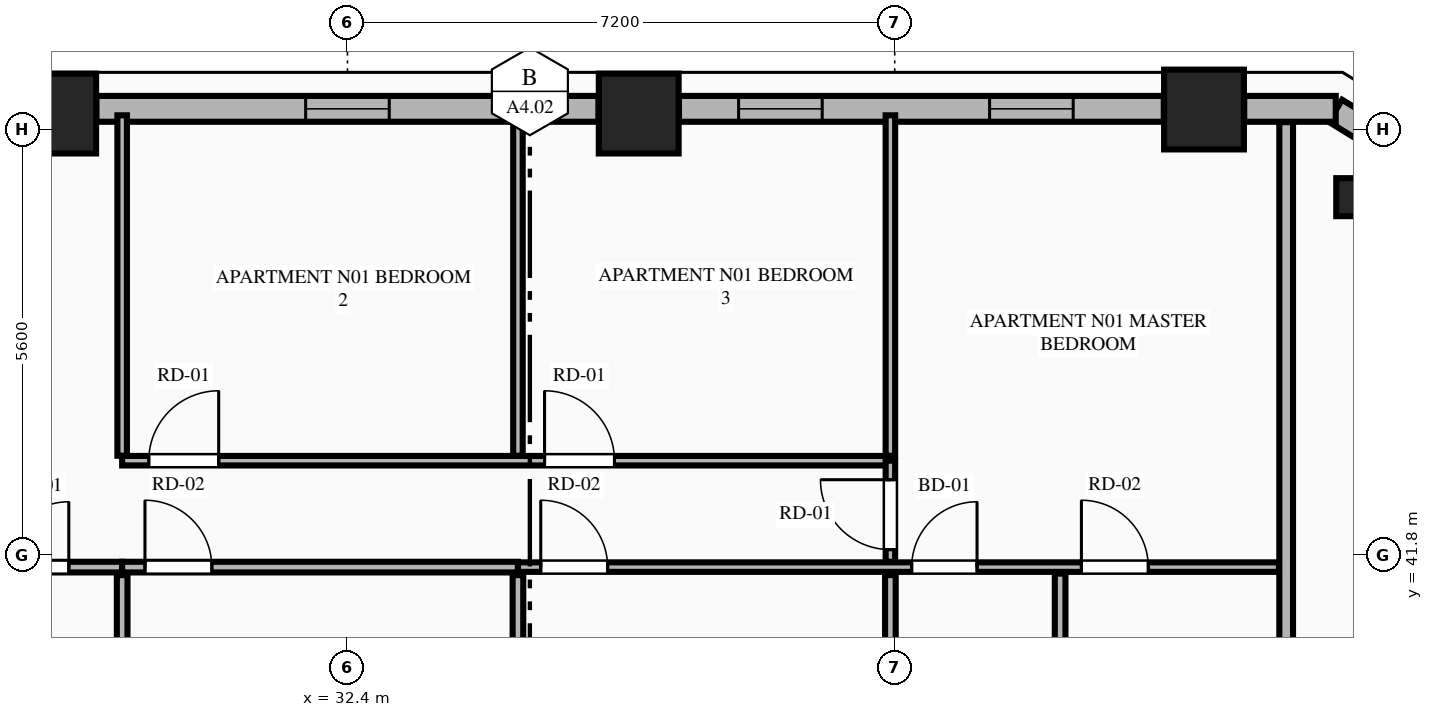
"""IFC4 building model, lengths in metres.
Left out: names, types, materials, properties, quantities, classifications, styles, units other than length and angle.
Written with IfcOpenShell. Run it as: python <this file> out.ifc"""

import sys

from ifc_helpers import new_model, si_unit, direction, frame, frame_2d, origin, origin_2d, place, context, subcontext, project, spatial, rectangle, extrude, element, fill, save


model = new_model("IFC4")
c1 = context("Model", 3, precision=1e-05, world=origin(), true_north=direction((0.0, 1.0)))
c2 = subcontext(c1, "Body", "Model", "MODEL_VIEW")
j1 = project(units=[si_unit("LENGTHUNIT", "METRE"), si_unit("PLANEANGLEUNIT", "RADIAN")], contexts=[c1])
p1 = place(None, origin())
s1 = spatial("IfcSite", under=j1, at=p1, CompositionType="ELEMENT")
p2 = place(p1, origin())
s2 = spatial("IfcBuilding", under=s1, at=p2, CompositionType="ELEMENT")
p3 = place(p2, frame((0.0, 0.0, 144.55)))
s3 = spatial("IfcBuildingStorey", under=s2, at=p3, CompositionType="ELEMENT", Elevation=144.55)
for number, where, z_axis, x_axis in (
    (1, (43.669, 47.661, 0.0), (0.0, 0.0, 1.0), (1.0, 0.0, 0.0)),
    (2, (36.232, 47.608, 0.0), (0.0, 0.0, 1.0), (1.0, 0.0, 0.0)),
    (3, (28.568, 47.608, 0.0), (0.0, 0.0, 1.0), (1.0, 0.0, 0.0)),
):
    element("IfcColumn", number, at=place(p3, frame(where, z_axis=z_axis, x_axis=x_axis)), inside=s3, PredefinedType="COLUMN", context=c2, shape_type="SweptSolid", body=[
        extrude(rectangle(XDim=1.05, YDim=1.05, at=origin_2d()), origin(), (0.0, 0.0, 1.0), 3.55),
    ])
p4 = place(p3, frame((45.659, 46.508, 0.0), z_axis=(0.0, 0.0, 1.0), x_axis=(-0.865160173452, 0.501495637342, 0.0)))
e4 = element("IfcColumn", 4, at=p4, inside=s3, PredefinedType="PILASTER", context=c2, shape_type="SweptSolid", body=[
    extrude(rectangle(XDim=0.5, YDim=0.35, at=origin_2d()), origin(), (0.0, 0.0, 1.0), 3.55),
])
p5 = place(p3, frame((46.971, 46.677, 0.0), z_axis=(0.0, 0.0, 1.0), x_axis=(-0.851798915137, 0.523868884523, 0.0)))
e5 = element("IfcWall", 5, at=p5, inside=s3, PredefinedType="STANDARD", context=c2, shape_type="SweptSolid", body=[
    extrude(rectangle(XDim=1.848, YDim=0.34, at=frame_2d((0.924, 0.0))), origin(), (0.0, 0.0, 1.0), 3.27),
])
p6 = place(p3, frame((45.402, 47.67, 0.0), z_axis=(0.0, 0.0, 1.0), x_axis=(-1.0, 0.0, 0.0)))
e6 = element("IfcWall", 6, at=p6, inside=s3, PredefinedType="STANDARD", context=c2, shape_type="SweptSolid", body=[
    extrude(rectangle(XDim=1.204, YDim=0.34, at=frame_2d((0.602, 0.0))), origin(), (0.0, 0.0, 1.0), 3.27),
])
p7 = place(p3, frame((43.14, 47.67, 0.0), z_axis=(0.0, 0.0, 1.0), x_axis=(-1.0, 0.0, 0.0)))
e7 = element("IfcWall", 7, at=p7, inside=s3, PredefinedType="STANDARD", context=c2, shape_type="SweptSolid", body=[
    extrude(rectangle(XDim=6.379, YDim=0.34, at=frame_2d((3.189, 0.0))), origin(), (0.0, 0.0, 1.0), 2.727),
])
p8 = place(p7, frame((1.192, 0.0, 0.75)))
e8 = element("IfcOpeningElement", 8, at=p8, cuts=e7, PredefinedType="OPENING", context=c2, shape_type="SweptSolid", body=[
    extrude(rectangle(XDim=1.1, YDim=1.827, at=frame_2d((0.55, 0.914))), frame((0.0, 0.18, 0.0), z_axis=(0.0, -1.0, 0.0), x_axis=(1.0, 0.0, 0.0)), (0.0, 0.0, 1.0), 0.36),
])
p9 = place(p7, frame((4.494, 0.0, 0.75)))
e9 = element("IfcOpeningElement", 9, at=p9, cuts=e7, PredefinedType="OPENING", context=c2, shape_type="SweptSolid", body=[
    extrude(rectangle(XDim=1.1, YDim=1.827, at=frame_2d((0.55, 0.914))), frame((0.0, 0.18, 0.0), z_axis=(0.0, -1.0, 0.0), x_axis=(1.0, 0.0, 0.0)), (0.0, 0.0, 1.0), 0.36),
])
p10 = place(p3, frame((35.703, 47.67, 0.0), z_axis=(0.0, 0.0, 1.0), x_axis=(-1.0, 0.0, 0.0)))
e10 = element("IfcWall", 10, at=p10, inside=s3, PredefinedType="STANDARD", context=c2, shape_type="SweptSolid", body=[
    extrude(rectangle(XDim=6.606, YDim=0.34, at=frame_2d((3.303, 0.0))), origin(), (0.0, 0.0, 1.0), 2.727),
])
p11 = place(p10, frame((2.753, 0.0, 0.75)))
e11 = element("IfcOpeningElement", 11, at=p11, cuts=e10, PredefinedType="OPENING", context=c2, shape_type="SweptSolid", body=[
    extrude(rectangle(XDim=1.1, YDim=1.827, at=frame_2d((0.55, 0.914))), frame((0.0, 0.18, 0.0), z_axis=(0.0, -1.0, 0.0), x_axis=(1.0, 0.0, 0.0)), (0.0, 0.0, 1.0), 0.36),
])
p12 = place(p3, frame((44.75, 35.3, 0.0), z_axis=(0.0, 0.0, 1.0), x_axis=(0.0, 1.0, 0.0)))
e12 = element("IfcWall", 12, at=p12, inside=s3, PredefinedType="PARTITIONING", context=c2, shape_type="SweptSolid", body=[
    extrude(rectangle(XDim=12.195, YDim=0.18, at=frame_2d((6.098, 0.0))), origin(), (0.0, 0.0, 1.0), 3.27),
])
p13 = place(p3, frame((22.1, 41.641, 0.0), z_axis=(0.0, 0.0, 1.0), x_axis=(1.0, 0.0, 0.0)))
e13 = element("IfcWall", 13, at=p13, inside=s3, PredefinedType="PLUMBINGWALL", context=c2, shape_type="SweptSolid", body=[
    extrude(rectangle(XDim=7.336, YDim=0.14, at=frame_2d((3.668, 0.0))), origin(), (0.0, 0.0, 1.0), 3.27),
])
p14 = place(p13, frame((5.774, 0.0, 0.0)))
e14 = element("IfcOpeningElement", 14, at=p14, cuts=e13, PredefinedType="OPENING", context=c2, shape_type="SweptSolid", body=[
    extrude(rectangle(XDim=0.86, YDim=2.1, at=frame_2d((0.43, 1.05))), frame((0.0, 0.08, 0.0), z_axis=(0.0, -1.0, 0.0), x_axis=(1.0, 0.0, 0.0)), (0.0, 0.0, 1.0), 0.16),
])
p15 = place(p13, frame((0.26, 0.0, 0.0)))
e15 = element("IfcOpeningElement", 15, at=p15, cuts=e13, PredefinedType="OPENING", context=c2, shape_type="SweptSolid", body=[
    extrude(rectangle(XDim=0.88, YDim=2.15, at=frame_2d((0.44, 1.075))), frame((0.0, 0.08, 0.0), z_axis=(0.0, -1.0, 0.0), x_axis=(1.0, 0.0, 0.0)), (0.0, 0.0, 1.0), 0.16),
])
p16 = place(p13, frame((3.485, 0.0, 0.0)))
e16 = element("IfcOpeningElement", 16, at=p16, cuts=e13, PredefinedType="OPENING", context=c2, shape_type="SweptSolid", body=[
    extrude(rectangle(XDim=0.88, YDim=2.15, at=frame_2d((0.44, 1.075))), frame((0.0, 0.08, 0.0), z_axis=(0.0, -1.0, 0.0), x_axis=(1.0, 0.0, 0.0)), (0.0, 0.0, 1.0), 0.16),
])
p17 = place(p3, frame((29.436, 41.641, 0.0), z_axis=(0.0, 0.0, 1.0), x_axis=(1.0, 0.0, 0.0)))
e17 = element("IfcWall", 17, at=p17, inside=s3, PredefinedType="PLUMBINGWALL", context=c2, shape_type="SweptSolid", body=[
    extrude(rectangle(XDim=5.207, YDim=0.14, at=frame_2d((2.604, 0.0))), origin(), (0.0, 0.0, 1.0), 3.27),
])
p18 = place(p17, frame((0.3, 0.0, 0.0)))
e18 = element("IfcOpeningElement", 18, at=p18, cuts=e17, PredefinedType="OPENING", context=c2, shape_type="SweptSolid", body=[
    extrude(rectangle(XDim=0.88, YDim=2.15, at=frame_2d((0.44, 1.075))), frame((0.0, 0.08, 0.0), z_axis=(0.0, -1.0, 0.0), x_axis=(1.0, 0.0, 0.0)), (0.0, 0.0, 1.0), 0.16),
])
p19 = place(p3, frame((34.643, 41.641, 0.0), z_axis=(0.0, 0.0, 1.0), x_axis=(1.0, 0.0, 0.0)))
e19 = element("IfcWall", 19, at=p19, inside=s3, PredefinedType="PARTITIONING", context=c2, shape_type="SweptSolid", body=[
    extrude(rectangle(XDim=10.012, YDim=0.125, at=frame_2d((5.006, 0.0))), origin(), (0.0, 0.0, 1.0), 3.27),
])
p20 = place(p19, frame((5.18, 0.0, 0.0)))
e20 = element("IfcOpeningElement", 20, at=p20, cuts=e19, PredefinedType="OPENING", context=c2, shape_type="SweptSolid", body=[
    extrude(rectangle(XDim=0.86, YDim=2.1, at=frame_2d((0.43, 1.05))), frame((0.0, 0.073, 0.0), z_axis=(0.0, -1.0, 0.0), x_axis=(1.0, 0.0, 0.0)), (0.0, 0.0, 1.0), 0.145),
])
p21 = place(p19, frame((7.413, 0.0, 0.0)))
e21 = element("IfcOpeningElement", 21, at=p21, cuts=e19, PredefinedType="OPENING", context=c2, shape_type="SweptSolid", body=[
    extrude(rectangle(XDim=0.88, YDim=2.15, at=frame_2d((0.44, 1.075))), frame((0.0, 0.073, 0.0), z_axis=(0.0, -1.0, 0.0), x_axis=(1.0, 0.0, 0.0)), (0.0, 0.0, 1.0), 0.145),
])
p22 = place(p19, frame((0.3, 0.0, 0.0)))
e22 = element("IfcOpeningElement", 22, at=p22, cuts=e19, PredefinedType="OPENING", context=c2, shape_type="SweptSolid", body=[
    extrude(rectangle(XDim=0.88, YDim=2.15, at=frame_2d((0.44, 1.075))), frame((0.0, 0.073, 0.0), z_axis=(0.0, -1.0, 0.0), x_axis=(1.0, 0.0, 0.0)), (0.0, 0.0, 1.0), 0.145),
])
p23 = place(p3, frame((29.436, 43.106, 0.0), z_axis=(0.0, 0.0, 1.0), x_axis=(0.0, 1.0, 0.0)))
e23 = element("IfcWall", 23, at=p23, inside=s3, PredefinedType="PARTITIONING", context=c2, shape_type="SweptSolid", body=[
    extrude(rectangle(XDim=4.479, YDim=0.125, at=frame_2d((2.24, 0.0))), origin(), (0.0, 0.0, 1.0), 3.27),
])
p24 = place(p3, frame((29.436, 43.041, 0.0), z_axis=(0.0, 0.0, 1.0), x_axis=(1.0, 0.0, 0.0)))
e24 = element("IfcWall", 24, at=p24, inside=s3, PredefinedType="PARTITIONING", context=c2, shape_type="SweptSolid", body=[
    extrude(rectangle(XDim=10.107, YDim=0.125, at=frame_2d((5.053, 0.0))), origin(), (0.0, 0.0, 1.0), 3.27),
])
p25 = place(p24, frame((0.35, 0.0, 0.0)))
e25 = element("IfcOpeningElement", 25, at=p25, cuts=e24, PredefinedType="OPENING", context=c2, shape_type="SweptSolid", body=[
    extrude(rectangle(XDim=0.92, YDim=2.15, at=frame_2d((0.46, 1.075))), frame((0.0, 0.073, 0.0), z_axis=(0.0, -1.0, 0.0), x_axis=(1.0, 0.0, 0.0)), (0.0, 0.0, 1.0), 0.145),
])
p26 = place(p24, frame((5.557, 0.0, 0.0)))
e26 = element("IfcOpeningElement", 26, at=p26, cuts=e24, PredefinedType="OPENING", context=c2, shape_type="SweptSolid", body=[
    extrude(rectangle(XDim=0.92, YDim=2.15, at=frame_2d((0.46, 1.075))), frame((0.0, 0.073, 0.0), z_axis=(0.0, -1.0, 0.0), x_axis=(1.0, 0.0, 0.0)), (0.0, 0.0, 1.0), 0.145),
])
p27 = place(p3, frame((39.543, 41.711, 0.0), z_axis=(0.0, 0.0, 1.0), x_axis=(0.0, 1.0, 0.0)))
e27 = element("IfcWall", 27, at=p27, inside=s3, PredefinedType="PARTITIONING", context=c2, shape_type="SweptSolid", body=[
    extrude(rectangle(XDim=1.33, YDim=0.125, at=frame_2d((0.665, 0.0))), origin(), (0.0, 0.0, 1.0), 3.27),
])
p28 = place(p27, frame((0.16, 0.0, 0.0)))
e28 = element("IfcOpeningElement", 28, at=p28, cuts=e27, PredefinedType="OPENING", context=c2, shape_type="SweptSolid", body=[
    extrude(rectangle(XDim=0.92, YDim=2.15, at=frame_2d((0.46, 1.075))), frame((0.0, 0.073, 0.0), z_axis=(0.0, -1.0, 0.0), x_axis=(1.0, 0.0, 0.0)), (0.0, 0.0, 1.0), 0.145),
])
for number, where, z_axis, x_axis in (
    (29, (29.436, 35.385, 0.0), (0.0, 0.0, 1.0), (0.0, 1.0, 0.0)),
    (30, (34.643, 35.385, 0.0), (0.0, 0.0, 1.0), (0.0, 1.0, 0.0)),
):
    element("IfcWall", number, at=place(p3, frame(where, z_axis=z_axis, x_axis=x_axis)), inside=s3, PredefinedType="PLUMBINGWALL", context=c2, shape_type="SweptSolid", body=[
        extrude(rectangle(XDim=6.151, YDim=0.14, at=frame_2d((3.075, 0.0))), origin(), (0.0, 0.0, 1.0), 3.27),
    ])
for number, where, z_axis, x_axis in (
    (31, (34.643, 43.106, 0.0), (0.0, 0.0, 1.0), (0.0, 1.0, 0.0)),
    (32, (39.543, 43.106, 0.0), (0.0, 0.0, 1.0), (0.0, 1.0, 0.0)),
):
    element("IfcWall", number, at=place(p3, frame(where, z_axis=z_axis, x_axis=x_axis)), inside=s3, PredefinedType="PARTITIONING", context=c2, shape_type="SweptSolid", body=[
        extrude(rectangle(XDim=4.479, YDim=0.125, at=frame_2d((2.24, 0.0))), origin(), (0.0, 0.0, 1.0), 3.27),
    ])
p29 = place(p3, frame((39.543, 35.385, 0.0), z_axis=(0.0, 0.0, 1.0), x_axis=(0.0, 1.0, 0.0)))
e33 = element("IfcWall", 33, at=p29, inside=s3, PredefinedType="PLUMBINGWALL", context=c2, shape_type="SweptSolid", body=[
    extrude(rectangle(XDim=6.151, YDim=0.14, at=frame_2d((3.075, 0.0))), origin(), (0.0, 0.0, 1.0), 3.27),
])
p30 = place(p3, frame((41.776, 35.385, 0.0), z_axis=(0.0, 0.0, 1.0), x_axis=(0.0, 1.0, 0.0)))
e34 = element("IfcWall", 34, at=p30, inside=s3, PredefinedType="PLUMBINGWALL", context=c2, shape_type="SweptSolid", body=[
    extrude(rectangle(XDim=6.171, YDim=0.14, at=frame_2d((3.085, 0.0))), origin(), (0.0, 0.0, 1.0), 2.652),
])
p31 = place(p8, origin())
e35 = element("IfcWindow", 35, at=p31, inside=s3, PartitioningType="SINGLE_PANEL", PredefinedType="WINDOW", context=c2, shape_type="SweptSolid", body=[
    extrude(rectangle(XDim=1.1, YDim=1.827, at=frame_2d((0.55, 0.914))), frame((0.0, 0.03, 0.0), z_axis=(0.0, -1.0, 0.0), x_axis=(1.0, 0.0, 0.0)), (0.0, 0.0, 1.0), 0.06),
])
fill(e8, e35)
p32 = place(p11, origin())
e36 = element("IfcWindow", 36, at=p32, inside=s3, PartitioningType="SINGLE_PANEL", PredefinedType="WINDOW", context=c2, shape_type="SweptSolid", body=[
    extrude(rectangle(XDim=1.1, YDim=1.827, at=frame_2d((0.55, 0.914))), frame((0.0, 0.03, 0.0), z_axis=(0.0, -1.0, 0.0), x_axis=(1.0, 0.0, 0.0)), (0.0, 0.0, 1.0), 0.06),
])
fill(e11, e36)
p33 = place(p14, origin())
e37 = element("IfcDoor", 37, at=p33, inside=s3, OperationType="SINGLE_SWING_RIGHT", PredefinedType="DOOR", context=c2, shape_type="SweptSolid", body=[
    extrude(rectangle(XDim=0.86, YDim=2.1, at=frame_2d((0.43, 1.05))), frame((0.0, 0.025, 0.0), z_axis=(0.0, -1.0, 0.0), x_axis=(1.0, 0.0, 0.0)), (0.0, 0.0, 1.0), 0.05),
])
fill(e14, e37)
p34 = place(p20, origin())
e38 = element("IfcDoor", 38, at=p34, inside=s3, OperationType="SINGLE_SWING_RIGHT", PredefinedType="DOOR", context=c2, shape_type="SweptSolid", body=[
    extrude(rectangle(XDim=0.86, YDim=2.1, at=frame_2d((0.43, 1.05))), frame((0.0, 0.025, 0.0), z_axis=(0.0, -1.0, 0.0), x_axis=(1.0, 0.0, 0.0)), (0.0, 0.0, 1.0), 0.05),
])
fill(e20, e38)
p35 = place(p21, origin())
e39 = element("IfcDoor", 39, at=p35, inside=s3, OperationType="SINGLE_SWING_LEFT", PredefinedType="DOOR", context=c2, shape_type="SweptSolid", body=[
    extrude(rectangle(XDim=0.88, YDim=2.15, at=frame_2d((0.44, 1.075))), frame((0.0, 0.025, 0.0), z_axis=(0.0, -1.0, 0.0), x_axis=(1.0, 0.0, 0.0)), (0.0, 0.0, 1.0), 0.05),
])
fill(e21, e39)
p36 = place(p18, origin())
e40 = element("IfcDoor", 40, at=p36, inside=s3, OperationType="SINGLE_SWING_LEFT", PredefinedType="DOOR", context=c2, shape_type="SweptSolid", body=[
    extrude(rectangle(XDim=0.88, YDim=2.15, at=frame_2d((0.44, 1.075))), frame((0.0, 0.025, 0.0), z_axis=(0.0, -1.0, 0.0), x_axis=(1.0, 0.0, 0.0)), (0.0, 0.0, 1.0), 0.05),
])
fill(e18, e40)
p37 = place(p25, origin())
e41 = element("IfcDoor", 41, at=p37, inside=s3, OperationType="SINGLE_SWING_RIGHT", PredefinedType="DOOR", context=c2, shape_type="SweptSolid", body=[
    extrude(rectangle(XDim=0.92, YDim=2.15, at=frame_2d((0.46, 1.075))), frame((0.0, 0.025, 0.0), z_axis=(0.0, -1.0, 0.0), x_axis=(1.0, 0.0, 0.0)), (0.0, 0.0, 1.0), 0.05),
])
fill(e25, e41)
p38 = place(p26, origin())
e42 = element("IfcDoor", 42, at=p38, inside=s3, OperationType="SINGLE_SWING_LEFT", PredefinedType="DOOR", context=c2, shape_type="SweptSolid", body=[
    extrude(rectangle(XDim=0.92, YDim=2.15, at=frame_2d((0.46, 1.075))), frame((0.0, 0.025, 0.0), z_axis=(0.0, -1.0, 0.0), x_axis=(1.0, 0.0, 0.0)), (0.0, 0.0, 1.0), 0.05),
])
fill(e26, e42)
p39 = place(p28, origin())
e43 = element("IfcDoor", 43, at=p39, inside=s3, OperationType="SINGLE_SWING_RIGHT", PredefinedType="DOOR", context=c2, shape_type="SweptSolid", body=[
    extrude(rectangle(XDim=0.92, YDim=2.15, at=frame_2d((0.46, 1.075))), frame((0.0, 0.025, 0.0), z_axis=(0.0, -1.0, 0.0), x_axis=(1.0, 0.0, 0.0)), (0.0, 0.0, 1.0), 0.05),
])
fill(e28, e43)
p40 = place(p22, origin())
e44 = element("IfcDoor", 44, at=p40, inside=s3, OperationType="SINGLE_SWING_LEFT", PredefinedType="DOOR", context=c2, shape_type="SweptSolid", body=[
    extrude(rectangle(XDim=0.88, YDim=2.15, at=frame_2d((0.44, 1.075))), frame((0.0, 0.025, 0.0), z_axis=(0.0, -1.0, 0.0), x_axis=(1.0, 0.0, 0.0)), (0.0, 0.0, 1.0), 0.05),
])
fill(e22, e44)
p41 = place(p9, origin())
e45 = element("IfcWindow", 45, at=p41, inside=s3, PartitioningType="SINGLE_PANEL", PredefinedType="WINDOW", context=c2, shape_type="SweptSolid", body=[
    extrude(rectangle(XDim=1.1, YDim=1.827, at=frame_2d((0.55, 0.914))), frame((0.0, 0.03, 0.0), z_axis=(0.0, -1.0, 0.0), x_axis=(1.0, 0.0, 0.0)), (0.0, 0.0, 1.0), 0.06),
])
fill(e9, e45)
save(model, sys.argv[1])
